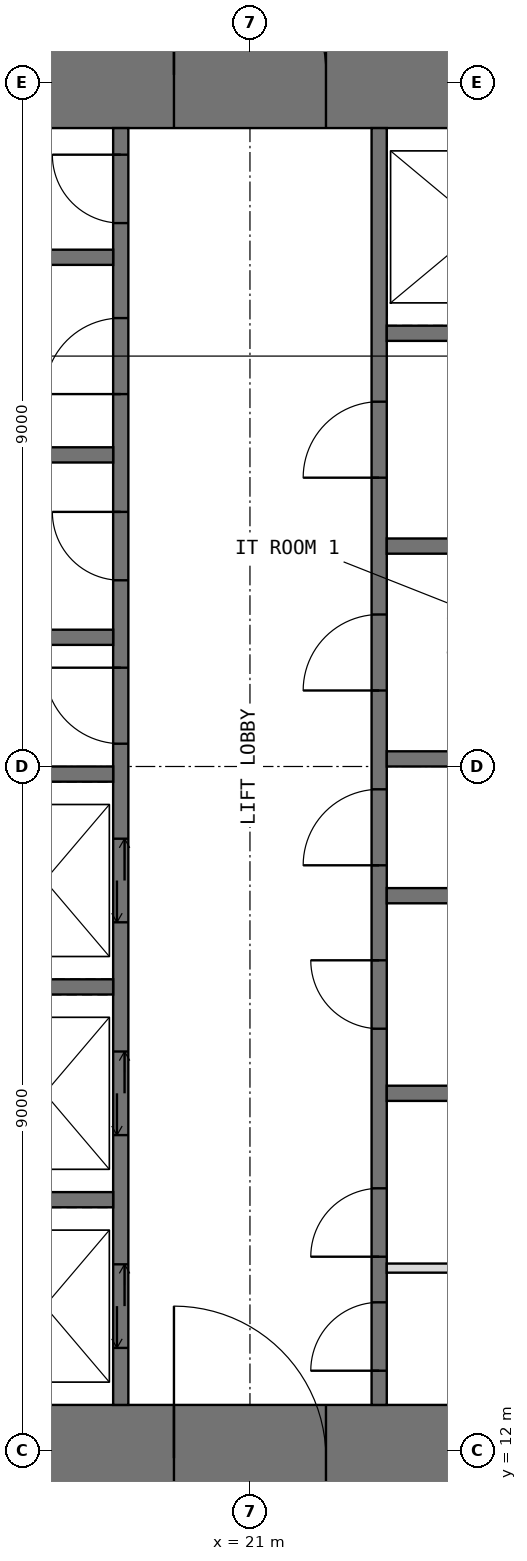
"""IFC4 building model, lengths in metres.
Left out: names, types, materials, properties, quantities, classifications, styles, units other than length and angle.
Written with IfcOpenShell. Run it as: python <this file> out.ifc"""

import sys

from ifc_helpers import new_model, si_unit, direction, frame, frame_2d, origin, place, context, subcontext, project, spatial, rectangle, extrude, element, fill, save


model = new_model("IFC4")
c1 = context("Model", 3, precision=1e-05, world=origin(), true_north=direction((0.0, 1.0)))
c2 = subcontext(c1, "Body", "Model", "MODEL_VIEW")
j1 = project(units=[si_unit("LENGTHUNIT", "METRE"), si_unit("PLANEANGLEUNIT", "RADIAN")], contexts=[c1])
p1 = place(None, origin())
s1 = spatial("IfcSite", under=j1, at=p1, CompositionType="ELEMENT")
p2 = place(p1, origin())
s2 = spatial("IfcBuilding", under=s1, at=p2, CompositionType="ELEMENT")
p3 = place(p2, frame((0.0, 0.0, 198.5)))
s3 = spatial("IfcBuildingStorey", under=s2, at=p3, CompositionType="ELEMENT", Elevation=198.5)
p4 = place(p3, frame((11.2, 11.9, -0.05), z_axis=(0.0, 0.0, 1.0), x_axis=(1.0, 0.0, 0.0)))
e1 = element("IfcWall", 1, at=p4, inside=s3, PredefinedType="SHEAR", context=c2, shape_type="SweptSolid", body=[
    extrude(rectangle(XDim=19.6, YDim=1.4, at=frame_2d((9.8, 0.0))), origin(), (0.0, 0.0, 1.0), 4.0),
])
p5 = place(p4, frame((8.8, 0.0, 0.05)))
e2 = element("IfcOpeningElement", 2, at=p5, cuts=e1, PredefinedType="OPENING", context=c2, shape_type="SweptSolid", body=[
    extrude(rectangle(XDim=2.0, YDim=2.2, at=frame_2d((1.0, 1.1))), frame((0.0, 0.71, 0.0), z_axis=(0.0, -1.0, 0.0), x_axis=(1.0, 0.0, 0.0)), (0.0, 0.0, 1.0), 1.42),
])
p6 = place(p3, frame((11.2, 30.1, -0.05), z_axis=(0.0, 0.0, 1.0), x_axis=(1.0, 0.0, 0.0)))
e3 = element("IfcWall", 3, at=p6, inside=s3, PredefinedType="SHEAR", context=c2, shape_type="SweptSolid", body=[
    extrude(rectangle(XDim=19.6, YDim=1.4, at=frame_2d((9.8, 0.0))), origin(), (0.0, 0.0, 1.0), 4.0),
])
p7 = place(p6, frame((8.8, 0.0, 0.05)))
e4 = element("IfcOpeningElement", 4, at=p7, cuts=e3, PredefinedType="OPENING", context=c2, shape_type="SweptSolid", body=[
    extrude(rectangle(XDim=2.0, YDim=2.2, at=frame_2d((1.0, 1.1))), frame((0.0, 0.71, 0.0), z_axis=(0.0, -1.0, 0.0), x_axis=(1.0, 0.0, 0.0)), (0.0, 0.0, 1.0), 1.42),
])
p8 = place(p3, frame((19.3, 12.6, -0.05), z_axis=(0.0, 0.0, 1.0), x_axis=(0.0, 1.0, 0.0)))
e5 = element("IfcWall", 5, at=p8, inside=s3, PredefinedType="SHEAR", context=c2, shape_type="SweptSolid", body=[
    extrude(rectangle(XDim=16.8, YDim=0.2, at=frame_2d((8.4, 0.0))), origin(), (0.0, 0.0, 1.0), 4.0),
])
p9 = place(p8, frame((8.7, 0.0, 0.05)))
e6 = element("IfcOpeningElement", 6, at=p9, cuts=e5, PredefinedType="OPENING", context=c2, shape_type="SweptSolid", body=[
    extrude(rectangle(XDim=1.0, YDim=2.2, at=frame_2d((0.5, 1.1))), frame((0.0, 0.11, 0.0), z_axis=(0.0, -1.0, 0.0), x_axis=(1.0, 0.0, 0.0)), (0.0, 0.0, 1.0), 0.22),
])
p10 = place(p8, frame((10.85, 0.0, 0.05)))
e7 = element("IfcOpeningElement", 7, at=p10, cuts=e5, PredefinedType="OPENING", context=c2, shape_type="SweptSolid", body=[
    extrude(rectangle(XDim=0.9, YDim=2.2, at=frame_2d((0.45, 1.1))), frame((0.0, 0.11, 0.0), z_axis=(0.0, -1.0, 0.0), x_axis=(1.0, 0.0, 0.0)), (0.0, 0.0, 1.0), 0.22),
])
p11 = place(p8, frame((13.3, 0.0, 0.05)))
e8 = element("IfcOpeningElement", 8, at=p11, cuts=e5, PredefinedType="OPENING", context=c2, shape_type="SweptSolid", body=[
    extrude(rectangle(XDim=1.0, YDim=2.2, at=frame_2d((0.5, 1.1))), frame((0.0, 0.11, 0.0), z_axis=(0.0, -1.0, 0.0), x_axis=(1.0, 0.0, 0.0)), (0.0, 0.0, 1.0), 0.22),
])
p12 = place(p8, frame((15.55, 0.0, 0.05)))
e9 = element("IfcOpeningElement", 9, at=p12, cuts=e5, PredefinedType="OPENING", context=c2, shape_type="SweptSolid", body=[
    extrude(rectangle(XDim=0.9, YDim=2.2, at=frame_2d((0.45, 1.1))), frame((0.0, 0.11, 0.0), z_axis=(0.0, -1.0, 0.0), x_axis=(1.0, 0.0, 0.0)), (0.0, 0.0, 1.0), 0.22),
])
p13 = place(p8, frame((0.75, 0.0, 0.05)))
e10 = element("IfcOpeningElement", 10, at=p13, cuts=e5, PredefinedType="OPENING", context=c2, shape_type="SweptSolid", body=[
    extrude(rectangle(XDim=1.1, YDim=2.2, at=frame_2d((0.55, 1.1))), frame((0.0, 0.11, 0.0), z_axis=(0.0, -1.0, 0.0), x_axis=(1.0, 0.0, 0.0)), (0.0, 0.0, 1.0), 0.22),
])
p14 = place(p8, frame((3.55, 0.0, 0.05)))
e11 = element("IfcOpeningElement", 11, at=p14, cuts=e5, PredefinedType="OPENING", context=c2, shape_type="SweptSolid", body=[
    extrude(rectangle(XDim=1.1, YDim=2.2, at=frame_2d((0.55, 1.1))), frame((0.0, 0.11, 0.0), z_axis=(0.0, -1.0, 0.0), x_axis=(1.0, 0.0, 0.0)), (0.0, 0.0, 1.0), 0.22),
])
p15 = place(p8, frame((6.35, 0.0, 0.05)))
e12 = element("IfcOpeningElement", 12, at=p15, cuts=e5, PredefinedType="OPENING", context=c2, shape_type="SweptSolid", body=[
    extrude(rectangle(XDim=1.1, YDim=2.2, at=frame_2d((0.55, 1.1))), frame((0.0, 0.11, 0.0), z_axis=(0.0, -1.0, 0.0), x_axis=(1.0, 0.0, 0.0)), (0.0, 0.0, 1.0), 0.22),
])
p16 = place(p3, frame((22.7, 12.6, -0.05), z_axis=(0.0, 0.0, 1.0), x_axis=(0.0, 1.0, 0.0)))
e13 = element("IfcWall", 13, at=p16, inside=s3, PredefinedType="SHEAR", context=c2, shape_type="SweptSolid", body=[
    extrude(rectangle(XDim=16.8, YDim=0.2, at=frame_2d((8.4, 0.0))), origin(), (0.0, 0.0, 1.0), 4.0),
])
p17 = place(p16, frame((0.45, 0.0, 0.05)))
e14 = element("IfcOpeningElement", 14, at=p17, cuts=e13, PredefinedType="OPENING", context=c2, shape_type="SweptSolid", body=[
    extrude(rectangle(XDim=0.9, YDim=2.2, at=frame_2d((0.45, 1.1))), frame((0.0, 0.11, 0.0), z_axis=(0.0, -1.0, 0.0), x_axis=(1.0, 0.0, 0.0)), (0.0, 0.0, 1.0), 0.22),
])
p18 = place(p16, frame((7.1, 0.0, 0.05)))
e15 = element("IfcOpeningElement", 15, at=p18, cuts=e13, PredefinedType="OPENING", context=c2, shape_type="SweptSolid", body=[
    extrude(rectangle(XDim=1.0, YDim=2.2, at=frame_2d((0.5, 1.1))), frame((0.0, 0.11, 0.0), z_axis=(0.0, -1.0, 0.0), x_axis=(1.0, 0.0, 0.0)), (0.0, 0.0, 1.0), 0.22),
])
p19 = place(p16, frame((1.95, 0.0, 0.05)))
e16 = element("IfcOpeningElement", 16, at=p19, cuts=e13, PredefinedType="OPENING", context=c2, shape_type="SweptSolid", body=[
    extrude(rectangle(XDim=0.9, YDim=2.2, at=frame_2d((0.45, 1.1))), frame((0.0, 0.11, 0.0), z_axis=(0.0, -1.0, 0.0), x_axis=(1.0, 0.0, 0.0)), (0.0, 0.0, 1.0), 0.22),
])
p20 = place(p16, frame((4.95, 0.0, 0.05)))
e17 = element("IfcOpeningElement", 17, at=p20, cuts=e13, PredefinedType="OPENING", context=c2, shape_type="SweptSolid", body=[
    extrude(rectangle(XDim=0.9, YDim=2.2, at=frame_2d((0.45, 1.1))), frame((0.0, 0.11, 0.0), z_axis=(0.0, -1.0, 0.0), x_axis=(1.0, 0.0, 0.0)), (0.0, 0.0, 1.0), 0.22),
])
p21 = place(p16, frame((9.4, 0.0, 0.05)))
e18 = element("IfcOpeningElement", 18, at=p21, cuts=e13, PredefinedType="OPENING", context=c2, shape_type="SweptSolid", body=[
    extrude(rectangle(XDim=1.0, YDim=2.2, at=frame_2d((0.5, 1.1))), frame((0.0, 0.11, 0.0), z_axis=(0.0, -1.0, 0.0), x_axis=(1.0, 0.0, 0.0)), (0.0, 0.0, 1.0), 0.22),
])
p22 = place(p16, frame((12.2, 0.0, 0.05)))
e19 = element("IfcOpeningElement", 19, at=p22, cuts=e13, PredefinedType="OPENING", context=c2, shape_type="SweptSolid", body=[
    extrude(rectangle(XDim=1.0, YDim=2.2, at=frame_2d((0.5, 1.1))), frame((0.0, 0.11, 0.0), z_axis=(0.0, -1.0, 0.0), x_axis=(1.0, 0.0, 0.0)), (0.0, 0.0, 1.0), 0.22),
])
for number, where, z_axis, x_axis in (
    (20, (16.0, 15.3, -0.05), (0.0, 0.0, 1.0), (1.0, 0.0, 0.0)),
    (21, (16.0, 18.1, -0.05), (0.0, 0.0, 1.0), (1.0, 0.0, 0.0)),
    (22, (16.0, 20.9, -0.05), (0.0, 0.0, 1.0), (1.0, 0.0, 0.0)),
    (23, (16.0, 22.7, -0.05), (0.0, 0.0, 1.0), (1.0, 0.0, 0.0)),
    (24, (16.0, 25.1, -0.05), (0.0, 0.0, 1.0), (1.0, 0.0, 0.0)),
    (25, (16.0, 27.7, -0.05), (0.0, 0.0, 1.0), (1.0, 0.0, 0.0)),
    (26, (22.8, 16.7, -0.05), (0.0, 0.0, 1.0), (1.0, 0.0, 0.0)),
    (27, (22.8, 19.3, -0.05), (0.0, 0.0, 1.0), (1.0, 0.0, 0.0)),
    (28, (22.8, 21.1, -0.05), (0.0, 0.0, 1.0), (1.0, 0.0, 0.0)),
    (29, (22.8, 23.9, -0.05), (0.0, 0.0, 1.0), (1.0, 0.0, 0.0)),
    (30, (22.8, 26.7, -0.05), (0.0, 0.0, 1.0), (1.0, 0.0, 0.0)),
):
    element("IfcWall", number, at=place(p3, frame(where, z_axis=z_axis, x_axis=x_axis)), inside=s3, PredefinedType="SHEAR", context=c2, shape_type="SweptSolid", body=[
        extrude(rectangle(XDim=3.2, YDim=0.2, at=frame_2d((1.6, 0.0))), origin(), (0.0, 0.0, 1.0), 4.0),
    ])
p23 = place(p3, frame((22.8, 14.4, 0.0), z_axis=(0.0, 0.0, 1.0), x_axis=(1.0, 0.0, 0.0)))
e31 = element("IfcWall", 31, at=p23, inside=s3, PredefinedType="PARTITIONING", context=c2, shape_type="SweptSolid", body=[
    extrude(rectangle(XDim=3.2, YDim=0.12, at=frame_2d((1.6, 0.0))), origin(), (0.0, 0.0, 1.0), 3.75),
])
p24 = place(p5, origin())
e32 = element("IfcDoor", 32, at=p24, inside=s3, OperationType="DOUBLE_DOOR_SINGLE_SWING", PredefinedType="DOOR", context=c2, shape_type="SweptSolid", body=[
    extrude(rectangle(XDim=2.0, YDim=2.2, at=frame_2d((1.0, 1.1))), frame((0.0, 0.025, 0.0), z_axis=(0.0, -1.0, 0.0), x_axis=(1.0, 0.0, 0.0)), (0.0, 0.0, 1.0), 0.05),
])
fill(e2, e32)
p25 = place(p7, origin())
e33 = element("IfcDoor", 33, at=p25, inside=s3, OperationType="DOUBLE_DOOR_SINGLE_SWING", PredefinedType="DOOR", context=c2, shape_type="SweptSolid", body=[
    extrude(rectangle(XDim=2.0, YDim=2.2, at=frame_2d((1.0, 1.1))), frame((0.0, 0.025, 0.0), z_axis=(0.0, -1.0, 0.0), x_axis=(1.0, 0.0, 0.0)), (0.0, 0.0, 1.0), 0.05),
])
fill(e4, e33)
p26 = place(p17, origin())
e34 = element("IfcDoor", 34, at=p26, inside=s3, OperationType="SINGLE_SWING_LEFT", PredefinedType="DOOR", context=c2, shape_type="SweptSolid", body=[
    extrude(rectangle(XDim=0.9, YDim=2.2, at=frame_2d((0.45, 1.1))), frame((0.0, 0.025, 0.0), z_axis=(0.0, -1.0, 0.0), x_axis=(1.0, 0.0, 0.0)), (0.0, 0.0, 1.0), 0.05),
])
fill(e14, e34)
p27 = place(p9, origin())
e35 = element("IfcDoor", 35, at=p27, inside=s3, OperationType="SINGLE_SWING_RIGHT", PredefinedType="DOOR", context=c2, shape_type="SweptSolid", body=[
    extrude(rectangle(XDim=1.0, YDim=2.2, at=frame_2d((0.5, 1.1))), frame((0.0, 0.025, 0.0), z_axis=(0.0, -1.0, 0.0), x_axis=(1.0, 0.0, 0.0)), (0.0, 0.0, 1.0), 0.05),
])
fill(e6, e35)
p28 = place(p18, origin())
e36 = element("IfcDoor", 36, at=p28, inside=s3, OperationType="SINGLE_SWING_LEFT", PredefinedType="DOOR", context=c2, shape_type="SweptSolid", body=[
    extrude(rectangle(XDim=1.0, YDim=2.2, at=frame_2d((0.5, 1.1))), frame((0.0, 0.025, 0.0), z_axis=(0.0, -1.0, 0.0), x_axis=(1.0, 0.0, 0.0)), (0.0, 0.0, 1.0), 0.05),
])
fill(e15, e36)
p29 = place(p10, origin())
e37 = element("IfcDoor", 37, at=p29, inside=s3, OperationType="SINGLE_SWING_RIGHT", PredefinedType="DOOR", context=c2, shape_type="SweptSolid", body=[
    extrude(rectangle(XDim=0.9, YDim=2.2, at=frame_2d((0.45, 1.1))), frame((0.0, 0.025, 0.0), z_axis=(0.0, -1.0, 0.0), x_axis=(1.0, 0.0, 0.0)), (0.0, 0.0, 1.0), 0.05),
])
fill(e7, e37)
p30 = place(p11, origin())
e38 = element("IfcDoor", 38, at=p30, inside=s3, OperationType="SINGLE_SWING_LEFT", PredefinedType="DOOR", context=c2, shape_type="SweptSolid", body=[
    extrude(rectangle(XDim=1.0, YDim=2.2, at=frame_2d((0.5, 1.1))), frame((0.0, 0.025, 0.0), z_axis=(0.0, -1.0, 0.0), x_axis=(1.0, 0.0, 0.0)), (0.0, 0.0, 1.0), 0.05),
])
fill(e8, e38)
p31 = place(p12, origin())
e39 = element("IfcDoor", 39, at=p31, inside=s3, OperationType="SINGLE_SWING_RIGHT", PredefinedType="DOOR", context=c2, shape_type="SweptSolid", body=[
    extrude(rectangle(XDim=0.9, YDim=2.2, at=frame_2d((0.45, 1.1))), frame((0.0, 0.025, 0.0), z_axis=(0.0, -1.0, 0.0), x_axis=(1.0, 0.0, 0.0)), (0.0, 0.0, 1.0), 0.05),
])
fill(e9, e39)
p32 = place(p19, origin())
e40 = element("IfcDoor", 40, at=p32, inside=s3, OperationType="SINGLE_SWING_LEFT", PredefinedType="DOOR", context=c2, shape_type="SweptSolid", body=[
    extrude(rectangle(XDim=0.9, YDim=2.2, at=frame_2d((0.45, 1.1))), frame((0.0, 0.025, 0.0), z_axis=(0.0, -1.0, 0.0), x_axis=(1.0, 0.0, 0.0)), (0.0, 0.0, 1.0), 0.05),
])
fill(e16, e40)
p33 = place(p20, origin())
e41 = element("IfcDoor", 41, at=p33, inside=s3, OperationType="SINGLE_SWING_RIGHT", PredefinedType="DOOR", context=c2, shape_type="SweptSolid", body=[
    extrude(rectangle(XDim=0.9, YDim=2.2, at=frame_2d((0.45, 1.1))), frame((0.0, 0.025, 0.0), z_axis=(0.0, -1.0, 0.0), x_axis=(1.0, 0.0, 0.0)), (0.0, 0.0, 1.0), 0.05),
])
fill(e17, e41)
p34 = place(p21, origin())
e42 = element("IfcDoor", 42, at=p34, inside=s3, OperationType="SINGLE_SWING_LEFT", PredefinedType="DOOR", context=c2, shape_type="SweptSolid", body=[
    extrude(rectangle(XDim=1.0, YDim=2.2, at=frame_2d((0.5, 1.1))), frame((0.0, 0.025, 0.0), z_axis=(0.0, -1.0, 0.0), x_axis=(1.0, 0.0, 0.0)), (0.0, 0.0, 1.0), 0.05),
])
fill(e18, e42)
p35 = place(p22, origin())
e43 = element("IfcDoor", 43, at=p35, inside=s3, OperationType="SINGLE_SWING_LEFT", PredefinedType="DOOR", context=c2, shape_type="SweptSolid", body=[
    extrude(rectangle(XDim=1.0, YDim=2.2, at=frame_2d((0.5, 1.1))), frame((0.0, 0.025, 0.0), z_axis=(0.0, -1.0, 0.0), x_axis=(1.0, 0.0, 0.0)), (0.0, 0.0, 1.0), 0.05),
])
fill(e19, e43)
p36 = place(p13, origin())
e44 = element("IfcDoor", 44, at=p36, inside=s3, OperationType="DOUBLE_DOOR_SLIDING", PredefinedType="DOOR", context=c2, shape_type="SweptSolid", body=[
    extrude(rectangle(XDim=1.1, YDim=2.2, at=frame_2d((0.55, 1.1))), frame((0.0, 0.025, 0.0), z_axis=(0.0, -1.0, 0.0), x_axis=(1.0, 0.0, 0.0)), (0.0, 0.0, 1.0), 0.05),
])
fill(e10, e44)
p37 = place(p14, origin())
e45 = element("IfcDoor", 45, at=p37, inside=s3, OperationType="DOUBLE_DOOR_SLIDING", PredefinedType="DOOR", context=c2, shape_type="SweptSolid", body=[
    extrude(rectangle(XDim=1.1, YDim=2.2, at=frame_2d((0.55, 1.1))), frame((0.0, 0.025, 0.0), z_axis=(0.0, -1.0, 0.0), x_axis=(1.0, 0.0, 0.0)), (0.0, 0.0, 1.0), 0.05),
])
fill(e11, e45)
p38 = place(p15, origin())
e46 = element("IfcDoor", 46, at=p38, inside=s3, OperationType="DOUBLE_DOOR_SLIDING", PredefinedType="DOOR", context=c2, shape_type="SweptSolid", body=[
    extrude(rectangle(XDim=1.1, YDim=2.2, at=frame_2d((0.55, 1.1))), frame((0.0, 0.025, 0.0), z_axis=(0.0, -1.0, 0.0), x_axis=(1.0, 0.0, 0.0)), (0.0, 0.0, 1.0), 0.05),
])
fill(e12, e46)
save(model, sys.argv[1])
